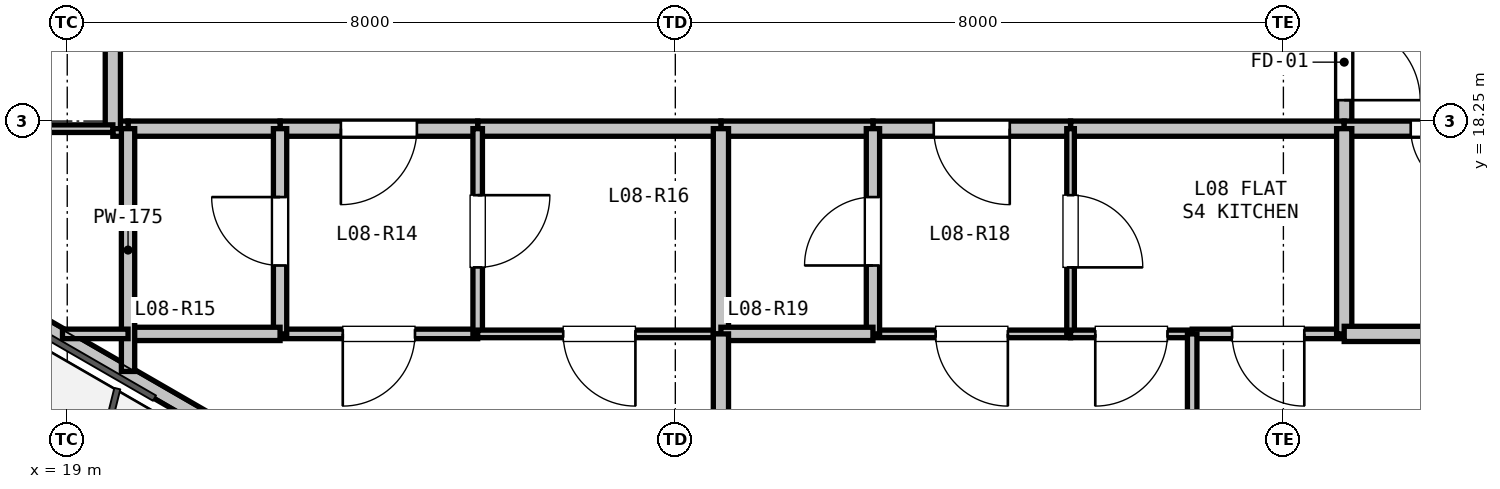
"""IFC4 building model, lengths in metres.
Left out: names, types, materials, properties, quantities, classifications, styles, units other than length and angle.
Written with IfcOpenShell. Run it as: python <this file> out.ifc"""

import sys

from ifc_helpers import new_model, si_unit, direction, frame, frame_2d, origin, place, context, subcontext, project, spatial, rectangle, extrude, element, fill, save


model = new_model("IFC4")
c1 = context("Model", 3, precision=1e-05, world=origin(), true_north=direction((0.0, 1.0)))
c2 = subcontext(c1, "Body", "Model", "MODEL_VIEW")
j1 = project(units=[si_unit("LENGTHUNIT", "METRE"), si_unit("PLANEANGLEUNIT", "RADIAN")], contexts=[c1])
p1 = place(None, origin())
s1 = spatial("IfcSite", under=j1, at=p1, CompositionType="ELEMENT")
p2 = place(p1, origin())
s2 = spatial("IfcBuilding", under=s1, at=p2, CompositionType="ELEMENT")
p3 = place(p2, frame((0.0, 0.0, 32.4)))
s3 = spatial("IfcBuildingStorey", under=s2, at=p3, CompositionType="ELEMENT", Elevation=32.4)
p4 = place(p3, frame((26.76, 10.896, 0.0), z_axis=(0.0, 0.0, 1.0), x_axis=(-0.866027351828, 0.499996625875, 0.0)))
e1 = element("IfcWall", 1, at=p4, inside=s3, PredefinedType="PARAPET", context=c2, shape_type="SweptSolid", body=[
    extrude(rectangle(XDim=11.973, YDim=0.2, at=frame_2d((5.987, 0.0))), origin(), (0.0, 0.0, 1.0), 0.2),
])
p5 = place(p3, frame((35.8, 19.9, 0.0), z_axis=(0.0, 0.0, 1.0), x_axis=(0.0, -1.0, 0.0)))
e2 = element("IfcWall", 2, at=p5, inside=s3, PredefinedType="PARTITIONING", context=c2, shape_type="SweptSolid", body=[
    extrude(rectangle(XDim=1.75, YDim=0.2, at=frame_2d((0.875, 0.0))), origin(), (0.0, 0.0, 1.0), 3.04),
])
p6 = place(p5, frame((0.375, 0.0, 0.0)))
e3 = element("IfcOpeningElement", 3, at=p6, cuts=e2, PredefinedType="OPENING", context=c2, shape_type="SweptSolid", body=[
    extrude(rectangle(XDim=1.0, YDim=2.15, at=frame_2d((0.5, 1.075))), frame((0.0, 0.11, 0.0), z_axis=(0.0, -1.0, 0.0), x_axis=(1.0, 0.0, 0.0)), (0.0, 0.0, 1.0), 0.22),
])
p7 = place(p3, frame((35.8, 18.15, 0.0), z_axis=(0.0, 0.0, 1.0), x_axis=(-1.0, 0.0, 0.0)))
e4 = element("IfcWall", 4, at=p7, inside=s3, PredefinedType="PARTITIONING", context=c2, shape_type="SweptSolid", body=[
    extrude(rectangle(XDim=3.6, YDim=0.2, at=frame_2d((1.8, 0.0))), origin(), (0.0, 0.0, 1.0), 3.04),
])
p8 = place(p3, frame((32.2, 18.15, 0.0), z_axis=(0.0, 0.0, 1.0), x_axis=(-1.0, 0.0, 0.0)))
e5 = element("IfcWall", 5, at=p8, inside=s3, PredefinedType="PARTITIONING", context=c2, shape_type="SweptSolid", body=[
    extrude(rectangle(XDim=2.6, YDim=0.2, at=frame_2d((1.3, 0.0))), origin(), (0.0, 0.0, 1.0), 3.04),
])
p9 = place(p8, frame((0.8, 0.0, 0.0)))
e6 = element("IfcOpeningElement", 6, at=p9, cuts=e5, PredefinedType="OPENING", context=c2, shape_type="SweptSolid", body=[
    extrude(rectangle(XDim=1.0, YDim=2.15, at=frame_2d((0.5, 1.075))), frame((0.0, 0.11, 0.0), z_axis=(0.0, -1.0, 0.0), x_axis=(1.0, 0.0, 0.0)), (0.0, 0.0, 1.0), 0.22),
])
p10 = place(p3, frame((29.6, 18.15, 0.0), z_axis=(0.0, 0.0, 1.0), x_axis=(-1.0, 0.0, 0.0)))
e7 = element("IfcWall", 7, at=p10, inside=s3, PredefinedType="PARTITIONING", context=c2, shape_type="SweptSolid", body=[
    extrude(rectangle(XDim=2.0, YDim=0.2, at=frame_2d((1.0, 0.0))), origin(), (0.0, 0.0, 1.0), 3.04),
])
p11 = place(p3, frame((27.6, 18.15, 0.0), z_axis=(0.0, 0.0, 1.0), x_axis=(-1.0, 0.0, 0.0)))
e8 = element("IfcWall", 8, at=p11, inside=s3, PredefinedType="PARTITIONING", context=c2, shape_type="SweptSolid", body=[
    extrude(rectangle(XDim=3.2, YDim=0.2, at=frame_2d((1.6, 0.0))), origin(), (0.0, 0.0, 1.0), 3.04),
])
p12 = place(p3, frame((24.4, 18.15, 0.0), z_axis=(0.0, 0.0, 1.0), x_axis=(-1.0, 0.0, 0.0)))
e9 = element("IfcWall", 9, at=p12, inside=s3, PredefinedType="PARTITIONING", context=c2, shape_type="SweptSolid", body=[
    extrude(rectangle(XDim=2.6, YDim=0.2, at=frame_2d((1.3, 0.0))), origin(), (0.0, 0.0, 1.0), 2.338),
])
p13 = place(p12, frame((0.8, 0.0, 0.0)))
e10 = element("IfcOpeningElement", 10, at=p13, cuts=e9, PredefinedType="OPENING", context=c2, shape_type="SweptSolid", body=[
    extrude(rectangle(XDim=1.0, YDim=2.15, at=frame_2d((0.5, 1.075))), frame((0.0, 0.11, 0.0), z_axis=(0.0, -1.0, 0.0), x_axis=(1.0, 0.0, 0.0)), (0.0, 0.0, 1.0), 0.22),
])
p14 = place(p3, frame((21.8, 18.15, 0.0), z_axis=(0.0, 0.0, 1.0), x_axis=(-1.0, 0.0, 0.0)))
e11 = element("IfcWall", 11, at=p14, inside=s3, PredefinedType="PARTITIONING", context=c2, shape_type="SweptSolid", body=[
    extrude(rectangle(XDim=2.0, YDim=0.2, at=frame_2d((1.0, 0.0))), origin(), (0.0, 0.0, 1.0), 3.04),
])
p15 = place(p3, frame((19.8, 18.15, 0.0), z_axis=(0.0, 0.0, 1.0), x_axis=(-1.0, 0.0, 0.0)))
e12 = element("IfcWall", 12, at=p15, inside=s3, PredefinedType="PARTITIONING", context=c2, shape_type="SweptSolid", body=[
    extrude(rectangle(XDim=0.2, YDim=0.2, at=frame_2d((0.1, 0.0))), origin(), (0.0, 0.0, 1.0), 3.04),
])
p16 = place(p3, frame((19.6, 18.15, 0.0), z_axis=(0.0, 0.0, 1.0), x_axis=(0.0, 1.0, 0.0)))
e13 = element("IfcWall", 13, at=p16, inside=s3, PredefinedType="PARTITIONING", context=c2, shape_type="SweptSolid", body=[
    extrude(rectangle(XDim=3.9, YDim=0.2, at=frame_2d((1.95, 0.0))), origin(), (0.0, 0.0, 1.0), 2.338),
])
p17 = place(p3, frame((38.4, 18.15, 0.0), z_axis=(0.0, 0.0, 1.0), x_axis=(-1.0, 0.0, 0.0)))
e14 = element("IfcWall", 14, at=p17, inside=s3, PredefinedType="PARTITIONING", context=c2, shape_type="SweptSolid", body=[
    extrude(rectangle(XDim=2.6, YDim=0.2, at=frame_2d((1.3, 0.0))), origin(), (0.0, 0.0, 1.0), 2.338),
])
p18 = place(p17, frame((0.875, 0.0, 0.0)))
e15 = element("IfcOpeningElement", 15, at=p18, cuts=e14, PredefinedType="OPENING", context=c2, shape_type="SweptSolid", body=[
    extrude(rectangle(XDim=0.85, YDim=2.1, at=frame_2d((0.425, 1.05))), frame((0.0, 0.11, 0.0), z_axis=(0.0, -1.0, 0.0), x_axis=(1.0, 0.0, 0.0)), (0.0, 0.0, 1.0), 0.22),
])
p19 = place(p3, frame((24.4, 15.45, 0.0), z_axis=(0.0, 0.0, 1.0), x_axis=(-1.0, 0.0, 0.0)))
e16 = element("IfcWall", 16, at=p19, inside=s3, PredefinedType="PARTITIONING", context=c2, shape_type="SweptSolid", body=[
    extrude(rectangle(XDim=2.6, YDim=0.125, at=frame_2d((1.3, 0.0))), origin(), (0.0, 0.0, 1.0), 3.04),
])
p20 = place(p19, frame((0.825, 0.0, 0.0)))
e17 = element("IfcOpeningElement", 17, at=p20, cuts=e16, PredefinedType="OPENING", context=c2, shape_type="SweptSolid", body=[
    extrude(rectangle(XDim=0.95, YDim=2.1, at=frame_2d((0.475, 1.05))), frame((0.0, 0.073, 0.0), z_axis=(0.0, -1.0, 0.0), x_axis=(1.0, 0.0, 0.0)), (0.0, 0.0, 1.0), 0.145),
])
p21 = place(p3, frame((21.8, 15.45, 0.0), z_axis=(0.0, 0.0, 1.0), x_axis=(0.0, 1.0, 0.0)))
e18 = element("IfcWall", 18, at=p21, inside=s3, PredefinedType="PLUMBINGWALL", context=c2, shape_type="SweptSolid", body=[
    extrude(rectangle(XDim=2.7, YDim=0.175, at=frame_2d((1.35, 0.0))), origin(), (0.0, 0.0, 1.0), 3.04),
])
p22 = place(p21, frame((0.9, 0.0, 0.0)))
e19 = element("IfcOpeningElement", 19, at=p22, cuts=e18, PredefinedType="OPENING", context=c2, shape_type="SweptSolid", body=[
    extrude(rectangle(XDim=0.9, YDim=2.1, at=frame_2d((0.45, 1.05))), frame((0.0, 0.097, 0.0), z_axis=(0.0, -1.0, 0.0), x_axis=(1.0, 0.0, 0.0)), (0.0, 0.0, 1.0), 0.195),
])
p23 = place(p3, frame((24.4, 18.15, 0.0), z_axis=(0.0, 0.0, 1.0), x_axis=(0.0, -1.0, 0.0)))
e20 = element("IfcWall", 20, at=p23, inside=s3, PredefinedType="PARTITIONING", context=c2, shape_type="SweptSolid", body=[
    extrude(rectangle(XDim=2.7, YDim=0.125, at=frame_2d((1.35, 0.0))), origin(), (0.0, 0.0, 1.0), 2.338),
])
p24 = place(p23, frame((0.875, 0.0, 0.0)))
e21 = element("IfcOpeningElement", 21, at=p24, cuts=e20, PredefinedType="OPENING", context=c2, shape_type="SweptSolid", body=[
    extrude(rectangle(XDim=0.95, YDim=2.1, at=frame_2d((0.475, 1.05))), frame((0.0, 0.073, 0.0), z_axis=(0.0, -1.0, 0.0), x_axis=(1.0, 0.0, 0.0)), (0.0, 0.0, 1.0), 0.145),
])
p25 = place(p3, frame((32.2, 15.45, 0.0), z_axis=(0.0, 0.0, 1.0), x_axis=(-1.0, 0.0, 0.0)))
e22 = element("IfcWall", 22, at=p25, inside=s3, PredefinedType="PARTITIONING", context=c2, shape_type="SweptSolid", body=[
    extrude(rectangle(XDim=2.6, YDim=0.1, at=frame_2d((1.3, 0.0))), origin(), (0.0, 0.0, 1.0), 3.04),
])
p26 = place(p25, frame((0.825, 0.0, 0.0)))
e23 = element("IfcOpeningElement", 23, at=p26, cuts=e22, PredefinedType="OPENING", context=c2, shape_type="SweptSolid", body=[
    extrude(rectangle(XDim=0.95, YDim=2.1, at=frame_2d((0.475, 1.05))), frame((0.0, 0.06, 0.0), z_axis=(0.0, -1.0, 0.0), x_axis=(1.0, 0.0, 0.0)), (0.0, 0.0, 1.0), 0.12),
])
p27 = place(p3, frame((29.6, 15.45, 0.0), z_axis=(0.0, 0.0, 1.0), x_axis=(0.0, 1.0, 0.0)))
e24 = element("IfcWall", 24, at=p27, inside=s3, PredefinedType="PLUMBINGWALL", context=c2, shape_type="SweptSolid", body=[
    extrude(rectangle(XDim=2.7, YDim=0.175, at=frame_2d((1.35, 0.0))), origin(), (0.0, 0.0, 1.0), 3.04),
])
p28 = place(p27, frame((0.9, 0.0, 0.0)))
e25 = element("IfcOpeningElement", 25, at=p28, cuts=e24, PredefinedType="OPENING", context=c2, shape_type="SweptSolid", body=[
    extrude(rectangle(XDim=0.9, YDim=2.1, at=frame_2d((0.45, 1.05))), frame((0.0, 0.097, 0.0), z_axis=(0.0, -1.0, 0.0), x_axis=(1.0, 0.0, 0.0)), (0.0, 0.0, 1.0), 0.195),
])
p29 = place(p3, frame((32.2, 18.15, 0.0), z_axis=(0.0, 0.0, 1.0), x_axis=(0.0, -1.0, 0.0)))
e26 = element("IfcWall", 26, at=p29, inside=s3, PredefinedType="PARTITIONING", context=c2, shape_type="SweptSolid", body=[
    extrude(rectangle(XDim=2.7, YDim=0.1, at=frame_2d((1.35, 0.0))), origin(), (0.0, 0.0, 1.0), 3.04),
])
p30 = place(p29, frame((0.875, 0.0, 0.0)))
e27 = element("IfcOpeningElement", 27, at=p30, cuts=e26, PredefinedType="OPENING", context=c2, shape_type="SweptSolid", body=[
    extrude(rectangle(XDim=0.95, YDim=2.1, at=frame_2d((0.475, 1.05))), frame((0.0, 0.06, 0.0), z_axis=(0.0, -1.0, 0.0), x_axis=(1.0, 0.0, 0.0)), (0.0, 0.0, 1.0), 0.12),
])
p31 = place(p3, frame((21.8, 15.45, 0.0), z_axis=(0.0, 0.0, 1.0), x_axis=(-1.0, 0.0, 0.0)))
e28 = element("IfcWall", 28, at=p31, inside=s3, PredefinedType="PLUMBINGWALL", context=c2, shape_type="SweptSolid", body=[
    extrude(rectangle(XDim=2.0, YDim=0.175, at=frame_2d((1.0, 0.0))), origin(), (0.0, 0.0, 1.0), 2.365),
])
p32 = place(p3, frame((19.8, 14.956, 0.0), z_axis=(0.0, 0.0, 1.0), x_axis=(0.0, 1.0, 0.0)))
e29 = element("IfcWall", 29, at=p32, inside=s3, PredefinedType="PLUMBINGWALL", context=c2, shape_type="SweptSolid", body=[
    extrude(rectangle(XDim=3.194, YDim=0.175, at=frame_2d((1.597, 0.0))), origin(), (0.0, 0.0, 1.0), 2.365),
])
p33 = place(p3, frame((27.6, 15.45, 0.0), z_axis=(0.0, 0.0, 1.0), x_axis=(-1.0, 0.0, 0.0)))
e30 = element("IfcWall", 30, at=p33, inside=s3, PredefinedType="PARTITIONING", context=c2, shape_type="SweptSolid", body=[
    extrude(rectangle(XDim=3.2, YDim=0.1, at=frame_2d((1.6, 0.0))), origin(), (0.0, 0.0, 1.0), 2.338),
])
p34 = place(p33, frame((1.125, 0.0, 0.0)))
e31 = element("IfcOpeningElement", 31, at=p34, cuts=e30, PredefinedType="OPENING", context=c2, shape_type="SweptSolid", body=[
    extrude(rectangle(XDim=0.95, YDim=2.1, at=frame_2d((0.475, 1.05))), frame((0.0, 0.06, 0.0), z_axis=(0.0, -1.0, 0.0), x_axis=(1.0, 0.0, 0.0)), (0.0, 0.0, 1.0), 0.12),
])
p35 = place(p3, frame((27.6, 18.15, 0.0), z_axis=(0.0, 0.0, 1.0), x_axis=(0.0, -1.0, 0.0)))
e32 = element("IfcWall", 32, at=p35, inside=s3, PredefinedType="PARTITIONING", context=c2, shape_type="SweptSolid", body=[
    extrude(rectangle(XDim=2.7, YDim=0.2, at=frame_2d((1.35, 0.0))), origin(), (0.0, 0.0, 1.0), 3.04),
])
p36 = place(p3, frame((29.6, 15.45, 0.0), z_axis=(0.0, 0.0, 1.0), x_axis=(-1.0, 0.0, 0.0)))
e33 = element("IfcWall", 33, at=p36, inside=s3, PredefinedType="PLUMBINGWALL", context=c2, shape_type="SweptSolid", body=[
    extrude(rectangle(XDim=2.0, YDim=0.175, at=frame_2d((1.0, 0.0))), origin(), (0.0, 0.0, 1.0), 3.04),
])
p37 = place(p3, frame((35.8, 15.45, 0.0), z_axis=(0.0, 0.0, 1.0), x_axis=(-1.0, 0.0, 0.0)))
e34 = element("IfcWall", 34, at=p37, inside=s3, PredefinedType="PARTITIONING", context=c2, shape_type="SweptSolid", body=[
    extrude(rectangle(XDim=2.0, YDim=0.125, at=frame_2d((1.0, 0.0))), origin(), (0.0, 0.0, 1.0), 3.04),
])
p38 = place(p37, frame((0.525, 0.0, 0.0)))
e35 = element("IfcOpeningElement", 35, at=p38, cuts=e34, PredefinedType="OPENING", context=c2, shape_type="SweptSolid", body=[
    extrude(rectangle(XDim=0.95, YDim=2.1, at=frame_2d((0.475, 1.05))), frame((0.0, 0.073, 0.0), z_axis=(0.0, -1.0, 0.0), x_axis=(1.0, 0.0, 0.0)), (0.0, 0.0, 1.0), 0.145),
])
p39 = place(p3, frame((33.8, 15.45, 0.0), z_axis=(0.0, 0.0, 1.0), x_axis=(-1.0, 0.0, 0.0)))
e36 = element("IfcWall", 36, at=p39, inside=s3, PredefinedType="PARTITIONING", context=c2, shape_type="SweptSolid", body=[
    extrude(rectangle(XDim=1.6, YDim=0.1, at=frame_2d((0.8, 0.0))), origin(), (0.0, 0.0, 1.0), 3.04),
])
p40 = place(p39, frame((0.325, 0.0, 0.0)))
e37 = element("IfcOpeningElement", 37, at=p40, cuts=e36, PredefinedType="OPENING", context=c2, shape_type="SweptSolid", body=[
    extrude(rectangle(XDim=0.95, YDim=2.1, at=frame_2d((0.475, 1.05))), frame((0.0, 0.06, 0.0), z_axis=(0.0, -1.0, 0.0), x_axis=(1.0, 0.0, 0.0)), (0.0, 0.0, 1.0), 0.12),
])
p41 = place(p3, frame((35.8, 18.15, 0.0), z_axis=(0.0, 0.0, 1.0), x_axis=(0.0, -1.0, 0.0)))
e38 = element("IfcWall", 38, at=p41, inside=s3, PredefinedType="PARTITIONING", context=c2, shape_type="SweptSolid", body=[
    extrude(rectangle(XDim=2.7, YDim=0.2, at=frame_2d((1.35, 0.0))), origin(), (0.0, 0.0, 1.0), 3.04),
])
p42 = place(p3, frame((19.6, 18.15, 0.0), z_axis=(0.0, 0.0, 1.0), x_axis=(-1.0, 0.0, 0.0)))
e39 = element("IfcWall", 39, at=p42, inside=s3, PredefinedType="PARTITIONING", context=c2, shape_type="SweptSolid", body=[
    extrude(rectangle(XDim=2.45, YDim=0.1, at=frame_2d((1.225, 0.0))), origin(), (0.0, 0.0, 1.0), 3.04),
])
p43 = place(p3, frame((43.688, 15.45, 0.0), z_axis=(0.0, 0.0, 1.0), x_axis=(-1.0, 0.0, 0.0)))
e40 = element("IfcWall", 40, at=p43, inside=s3, PredefinedType="PARTITIONING", context=c2, shape_type="SweptSolid", body=[
    extrude(rectangle(XDim=7.888, YDim=0.2, at=frame_2d((3.944, 0.0))), origin(), (0.0, 0.0, 1.0), 2.338),
])
p44 = place(p3, frame((18.938, 15.45, 0.0), z_axis=(0.0, 0.0, 1.0), x_axis=(1.0, 0.0, 0.0)))
e41 = element("IfcWall", 41, at=p44, inside=s3, PredefinedType="PARTITIONING", context=c2, shape_type="SweptSolid", body=[
    extrude(rectangle(XDim=0.863, YDim=0.125, at=frame_2d((0.431, 0.0))), origin(), (0.0, 0.0, 1.0), 2.65),
])
p45 = place(p3, frame((27.6, 15.45, 0.0), z_axis=(0.0, 0.0, 1.0), x_axis=(0.0, -1.0, 0.0)))
e42 = element("IfcWall", 42, at=p45, inside=s3, PredefinedType="PARTITIONING", context=c2, shape_type="SweptSolid", body=[
    extrude(rectangle(XDim=4.688, YDim=0.2, at=frame_2d((2.344, 0.0))), origin(), (0.0, 0.0, 1.0), 2.338),
])
p46 = place(p3, frame((33.8, 15.45, 0.0), z_axis=(0.0, 0.0, 1.0), x_axis=(0.0, -1.0, 0.0)))
e43 = element("IfcWall", 43, at=p46, inside=s3, PredefinedType="PARTITIONING", context=c2, shape_type="SweptSolid", body=[
    extrude(rectangle(XDim=5.91, YDim=0.125, at=frame_2d((2.955, 0.0))), origin(), (0.0, 0.0, 1.0), 3.04),
])
p47 = place(p46, frame((2.48, 0.0, 0.0)))
e44 = element("IfcOpeningElement", 44, at=p47, cuts=e43, PredefinedType="OPENING", context=c2, shape_type="SweptSolid", body=[
    extrude(rectangle(XDim=0.95, YDim=2.1, at=frame_2d((0.475, 1.05))), frame((0.0, 0.073, 0.0), z_axis=(0.0, -1.0, 0.0), x_axis=(1.0, 0.0, 0.0)), (0.0, 0.0, 1.0), 0.145),
])
p48 = place(p6, origin())
e45 = element("IfcDoor", 45, at=p48, inside=s3, OperationType="SINGLE_SWING_RIGHT", PredefinedType="DOOR", context=c2, shape_type="SweptSolid", body=[
    extrude(rectangle(XDim=1.0, YDim=2.15, at=frame_2d((0.5, 1.075))), frame((0.0, 0.025, 0.0), z_axis=(0.0, -1.0, 0.0), x_axis=(1.0, 0.0, 0.0)), (0.0, 0.0, 1.0), 0.05),
])
fill(e3, e45)
p49 = place(p13, origin())
e46 = element("IfcDoor", 46, at=p49, inside=s3, OperationType="SINGLE_SWING_RIGHT", PredefinedType="DOOR", context=c2, shape_type="SweptSolid", body=[
    extrude(rectangle(XDim=1.0, YDim=2.15, at=frame_2d((0.5, 1.075))), frame((0.0, 0.025, 0.0), z_axis=(0.0, -1.0, 0.0), x_axis=(1.0, 0.0, 0.0)), (0.0, 0.0, 1.0), 0.05),
])
fill(e10, e46)
p50 = place(p9, origin())
e47 = element("IfcDoor", 47, at=p50, inside=s3, OperationType="SINGLE_SWING_LEFT", PredefinedType="DOOR", context=c2, shape_type="SweptSolid", body=[
    extrude(rectangle(XDim=1.0, YDim=2.15, at=frame_2d((0.5, 1.075))), frame((0.0, 0.025, 0.0), z_axis=(0.0, -1.0, 0.0), x_axis=(1.0, 0.0, 0.0)), (0.0, 0.0, 1.0), 0.05),
])
fill(e6, e47)
p51 = place(p18, origin())
e48 = element("IfcDoor", 48, at=p51, inside=s3, OperationType="SINGLE_SWING_LEFT", PredefinedType="DOOR", context=c2, shape_type="SweptSolid", body=[
    extrude(rectangle(XDim=0.85, YDim=2.1, at=frame_2d((0.425, 1.05))), frame((0.0, 0.025, 0.0), z_axis=(0.0, -1.0, 0.0), x_axis=(1.0, 0.0, 0.0)), (0.0, 0.0, 1.0), 0.05),
])
fill(e15, e48)
p52 = place(p22, origin())
e49 = element("IfcDoor", 49, at=p52, inside=s3, OperationType="SINGLE_SWING_RIGHT", PredefinedType="DOOR", context=c2, shape_type="SweptSolid", body=[
    extrude(rectangle(XDim=0.9, YDim=2.1, at=frame_2d((0.45, 1.05))), frame((0.0, 0.025, 0.0), z_axis=(0.0, -1.0, 0.0), x_axis=(1.0, 0.0, 0.0)), (0.0, 0.0, 1.0), 0.05),
])
fill(e19, e49)
p53 = place(p24, origin())
e50 = element("IfcDoor", 50, at=p53, inside=s3, OperationType="SINGLE_SWING_LEFT", PredefinedType="DOOR", context=c2, shape_type="SweptSolid", body=[
    extrude(rectangle(XDim=0.95, YDim=2.1, at=frame_2d((0.475, 1.05))), frame((0.0, 0.025, 0.0), z_axis=(0.0, -1.0, 0.0), x_axis=(1.0, 0.0, 0.0)), (0.0, 0.0, 1.0), 0.05),
])
fill(e21, e50)
p54 = place(p20, origin())
e51 = element("IfcDoor", 51, at=p54, inside=s3, OperationType="SINGLE_SWING_RIGHT", PredefinedType="DOOR", context=c2, shape_type="SweptSolid", body=[
    extrude(rectangle(XDim=0.95, YDim=2.1, at=frame_2d((0.475, 1.05))), frame((0.0, 0.025, 0.0), z_axis=(0.0, -1.0, 0.0), x_axis=(1.0, 0.0, 0.0)), (0.0, 0.0, 1.0), 0.05),
])
fill(e17, e51)
p55 = place(p28, origin())
e52 = element("IfcDoor", 52, at=p55, inside=s3, OperationType="SINGLE_SWING_LEFT", PredefinedType="DOOR", context=c2, shape_type="SweptSolid", body=[
    extrude(rectangle(XDim=0.9, YDim=2.1, at=frame_2d((0.45, 1.05))), frame((0.0, 0.025, 0.0), z_axis=(0.0, -1.0, 0.0), x_axis=(1.0, 0.0, 0.0)), (0.0, 0.0, 1.0), 0.05),
])
fill(e25, e52)
p56 = place(p30, origin())
e53 = element("IfcDoor", 53, at=p56, inside=s3, OperationType="SINGLE_SWING_RIGHT", PredefinedType="DOOR", context=c2, shape_type="SweptSolid", body=[
    extrude(rectangle(XDim=0.95, YDim=2.1, at=frame_2d((0.475, 1.05))), frame((0.0, 0.025, 0.0), z_axis=(0.0, -1.0, 0.0), x_axis=(1.0, 0.0, 0.0)), (0.0, 0.0, 1.0), 0.05),
])
fill(e27, e53)
p57 = place(p26, origin())
e54 = element("IfcDoor", 54, at=p57, inside=s3, OperationType="SINGLE_SWING_LEFT", PredefinedType="DOOR", context=c2, shape_type="SweptSolid", body=[
    extrude(rectangle(XDim=0.95, YDim=2.1, at=frame_2d((0.475, 1.05))), frame((0.0, 0.025, 0.0), z_axis=(0.0, -1.0, 0.0), x_axis=(1.0, 0.0, 0.0)), (0.0, 0.0, 1.0), 0.05),
])
fill(e23, e54)
p58 = place(p34, origin())
e55 = element("IfcDoor", 55, at=p58, inside=s3, OperationType="SINGLE_SWING_LEFT", PredefinedType="DOOR", context=c2, shape_type="SweptSolid", body=[
    extrude(rectangle(XDim=0.95, YDim=2.1, at=frame_2d((0.475, 1.05))), frame((0.0, 0.025, 0.0), z_axis=(0.0, -1.0, 0.0), x_axis=(1.0, 0.0, 0.0)), (0.0, 0.0, 1.0), 0.05),
])
fill(e31, e55)
p59 = place(p40, origin())
e56 = element("IfcDoor", 56, at=p59, inside=s3, OperationType="SINGLE_SWING_RIGHT", PredefinedType="DOOR", context=c2, shape_type="SweptSolid", body=[
    extrude(rectangle(XDim=0.95, YDim=2.1, at=frame_2d((0.475, 1.05))), frame((0.0, 0.025, 0.0), z_axis=(0.0, -1.0, 0.0), x_axis=(1.0, 0.0, 0.0)), (0.0, 0.0, 1.0), 0.05),
])
fill(e37, e56)
p60 = place(p38, origin())
e57 = element("IfcDoor", 57, at=p60, inside=s3, OperationType="SINGLE_SWING_LEFT", PredefinedType="DOOR", context=c2, shape_type="SweptSolid", body=[
    extrude(rectangle(XDim=0.95, YDim=2.1, at=frame_2d((0.475, 1.05))), frame((0.0, 0.025, 0.0), z_axis=(0.0, -1.0, 0.0), x_axis=(1.0, 0.0, 0.0)), (0.0, 0.0, 1.0), 0.05),
])
fill(e35, e57)
save(model, sys.argv[1])
